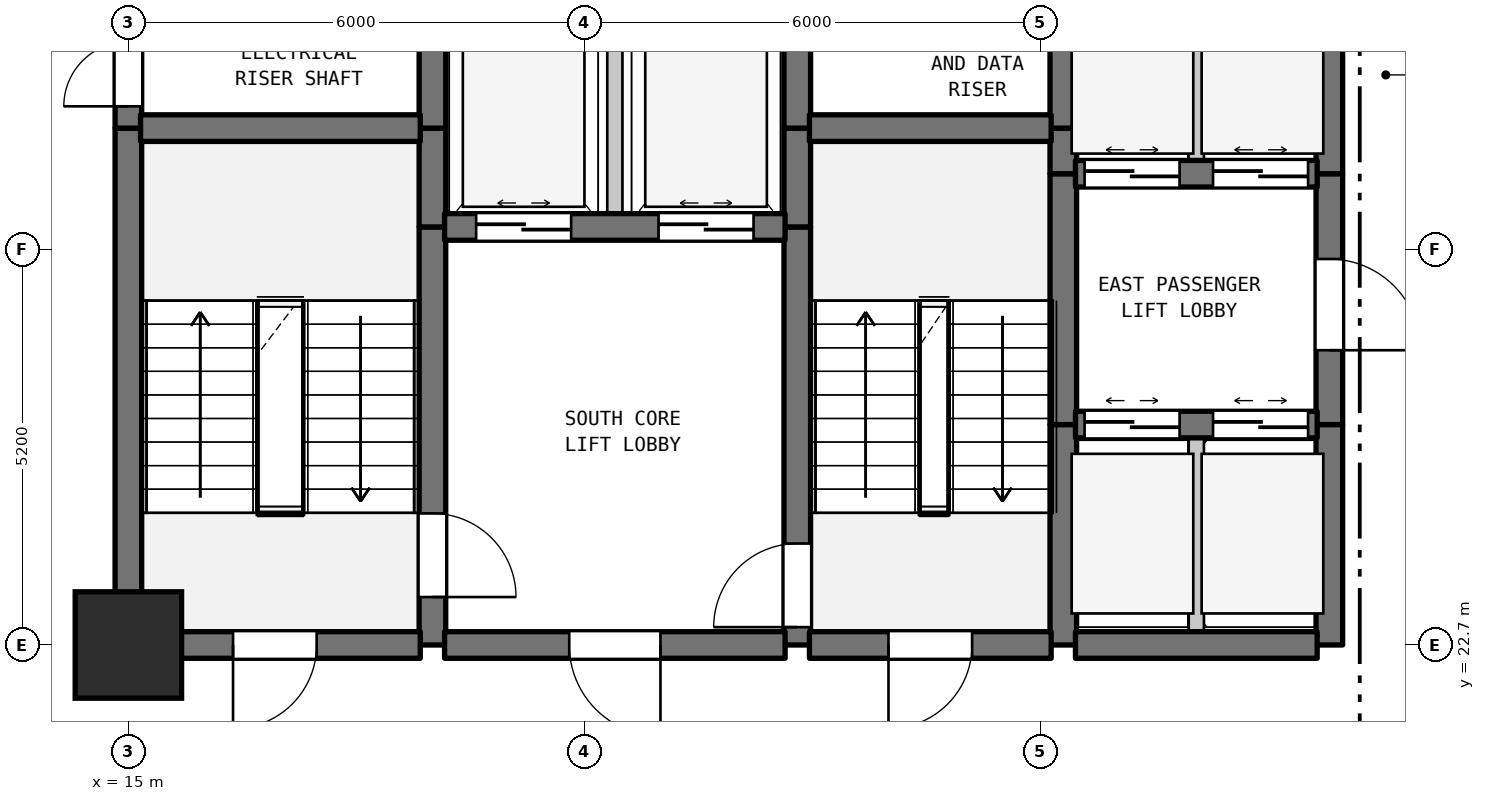
"""IFC4 building model, lengths in metres.
Left out: names, types, materials, properties, quantities, classifications, styles, units other than length and angle.
Written with IfcOpenShell. Run it as: python <this file> out.ifc"""

import sys

from ifc_helpers import new_model, si_unit, direction, frame, frame_2d, origin, origin_2d, place, context, subcontext, project, spatial, rectangle, extrude, element, fill, save


model = new_model("IFC4")
c1 = context("Model", 3, precision=1e-05, world=origin(), true_north=direction((0.0, 1.0)))
c2 = subcontext(c1, "Body", "Model", "MODEL_VIEW")
j1 = project(units=[si_unit("LENGTHUNIT", "METRE"), si_unit("PLANEANGLEUNIT", "RADIAN")], contexts=[c1])
p1 = place(None, origin())
s1 = spatial("IfcSite", under=j1, at=p1, CompositionType="ELEMENT")
p2 = place(p1, origin())
s2 = spatial("IfcBuilding", under=s1, at=p2, CompositionType="ELEMENT")
p3 = place(p2, origin())
s3 = spatial("IfcBuildingStorey", under=s2, at=p3, CompositionType="ELEMENT", Elevation=0.0)
p4 = place(p3, frame((15.0, 22.7, 0.0), z_axis=(0.0, 0.0, 1.0), x_axis=(1.0, 0.0, 0.0)))
e1 = element("IfcColumn", 1, at=p4, inside=s3, PredefinedType="COLUMN", context=c2, shape_type="SweptSolid", body=[
    extrude(rectangle(XDim=1.4, YDim=1.4, at=origin_2d()), origin(), (0.0, 0.0, 1.0), 6.5),
])
p5 = place(p3, frame((15.0, 22.7, 0.0), z_axis=(0.0, 0.0, 1.0), x_axis=(0.0, 1.0, 0.0)))
e2 = element("IfcWall", 2, at=p5, inside=s3, PredefinedType="SHEAR", context=c2, shape_type="SweptSolid", body=[
    extrude(rectangle(XDim=6.8, YDim=0.35, at=frame_2d((3.4, 0.0))), origin(), (0.0, 0.0, 1.0), 6.17),
])
p6 = place(p3, frame((15.0, 29.5, 0.0), z_axis=(0.0, 0.0, 1.0), x_axis=(0.0, 1.0, 0.0)))
e3 = element("IfcWall", 3, at=p6, inside=s3, PredefinedType="SHEAR", context=c2, shape_type="SweptSolid", body=[
    extrude(rectangle(XDim=1.6, YDim=0.35, at=frame_2d((0.8, 0.0))), origin(), (0.0, 0.0, 1.0), 6.17),
])
p7 = place(p6, frame((0.287, 0.0, 0.0)))
e4 = element("IfcOpeningElement", 4, at=p7, cuts=e3, PredefinedType="OPENING", context=c2, shape_type="SweptSolid", body=[
    extrude(rectangle(XDim=0.85, YDim=2.1, at=frame_2d((0.425, 1.05))), frame((0.0, 0.185, 0.0), z_axis=(0.0, -1.0, 0.0), x_axis=(1.0, 0.0, 0.0)), (0.0, 0.0, 1.0), 0.37),
])
p8 = place(p3, frame((19.0, 22.7, 0.0), z_axis=(0.0, 0.0, 1.0), x_axis=(0.0, 1.0, 0.0)))
e5 = element("IfcWall", 5, at=p8, inside=s3, PredefinedType="SHEAR", context=c2, shape_type="SweptSolid", body=[
    extrude(rectangle(XDim=5.5, YDim=0.35, at=frame_2d((2.75, 0.0))), origin(), (0.0, 0.0, 1.0), 6.17),
])
p9 = place(p8, frame((0.631, 0.0, 0.0)))
e6 = element("IfcOpeningElement", 6, at=p9, cuts=e5, PredefinedType="OPENING", context=c2, shape_type="SweptSolid", body=[
    extrude(rectangle(XDim=1.1, YDim=2.15, at=frame_2d((0.55, 1.075))), frame((0.0, 0.185, 0.0), z_axis=(0.0, -1.0, 0.0), x_axis=(1.0, 0.0, 0.0)), (0.0, 0.0, 1.0), 0.37),
])
p10 = place(p3, frame((19.0, 28.2, 0.0), z_axis=(0.0, 0.0, 1.0), x_axis=(0.0, 1.0, 0.0)))
e7 = element("IfcWall", 7, at=p10, inside=s3, PredefinedType="SHEAR", context=c2, shape_type="SweptSolid", body=[
    extrude(rectangle(XDim=1.3, YDim=0.35, at=frame_2d((0.65, 0.0))), origin(), (0.0, 0.0, 1.0), 6.17),
])
p11 = place(p3, frame((19.0, 29.5, 0.0), z_axis=(0.0, 0.0, 1.0), x_axis=(0.0, 1.0, 0.0)))
e8 = element("IfcWall", 8, at=p11, inside=s3, PredefinedType="SHEAR", context=c2, shape_type="SweptSolid", body=[
    extrude(rectangle(XDim=5.5, YDim=0.35, at=frame_2d((2.75, 0.0))), origin(), (0.0, 0.0, 1.0), 6.17),
])
p12 = place(p11, frame((2.025, 0.0, 0.0)))
e9 = element("IfcOpeningElement", 9, at=p12, cuts=e8, PredefinedType="OPENING", context=c2, shape_type="SweptSolid", body=[
    extrude(rectangle(XDim=1.1, YDim=2.15, at=frame_2d((0.55, 1.075))), frame((0.0, 0.185, 0.0), z_axis=(0.0, -1.0, 0.0), x_axis=(1.0, 0.0, 0.0)), (0.0, 0.0, 1.0), 0.37),
])
p13 = place(p3, frame((21.4, 28.2, 0.0), z_axis=(0.0, 0.0, 1.0), x_axis=(0.0, 1.0, 0.0)))
e10 = element("IfcWall", 10, at=p13, inside=s3, PredefinedType="STANDARD", context=c2, shape_type="SweptSolid", body=[
    extrude(rectangle(XDim=2.6, YDim=0.2, at=frame_2d((1.3, 0.0))), origin(), (0.0, 0.0, 1.0), 6.17),
])
p14 = place(p3, frame((23.8, 22.7, 0.0), z_axis=(0.0, 0.0, 1.0), x_axis=(0.0, 1.0, 0.0)))
e11 = element("IfcWall", 11, at=p14, inside=s3, PredefinedType="SHEAR", context=c2, shape_type="SweptSolid", body=[
    extrude(rectangle(XDim=5.5, YDim=0.35, at=frame_2d((2.75, 0.0))), origin(), (0.0, 0.0, 1.0), 6.17),
])
p15 = place(p14, frame((0.235, 0.0, 0.0)))
e12 = element("IfcOpeningElement", 12, at=p15, cuts=e11, PredefinedType="OPENING", context=c2, shape_type="SweptSolid", body=[
    extrude(rectangle(XDim=1.1, YDim=2.15, at=frame_2d((0.55, 1.075))), frame((0.0, 0.185, 0.0), z_axis=(0.0, -1.0, 0.0), x_axis=(1.0, 0.0, 0.0)), (0.0, 0.0, 1.0), 0.37),
])
for number, where, z_axis, x_axis in (
    (13, (23.8, 28.2, 0.0), (0.0, 0.0, 1.0), (0.0, 1.0, 0.0)),
    (14, (23.8, 29.5, 0.0), (0.0, 0.0, 1.0), (0.0, 1.0, 0.0)),
):
    element("IfcWall", number, at=place(p3, frame(where, z_axis=z_axis, x_axis=x_axis)), inside=s3, PredefinedType="SHEAR", context=c2, shape_type="SweptSolid", body=[
        extrude(rectangle(XDim=1.3, YDim=0.35, at=frame_2d((0.65, 0.0))), origin(), (0.0, 0.0, 1.0), 6.17),
    ])
p16 = place(p3, frame((27.3, 22.7, 0.0), z_axis=(0.0, 0.0, 1.0), x_axis=(0.0, 1.0, 0.0)))
e15 = element("IfcWall", 15, at=p16, inside=s3, PredefinedType="SHEAR", context=c2, shape_type="SweptSolid", body=[
    extrude(rectangle(XDim=2.9, YDim=0.35, at=frame_2d((1.45, 0.0))), origin(), (0.0, 0.0, 1.0), 6.17),
])
p17 = place(p3, frame((27.3, 25.6, 0.0), z_axis=(0.0, 0.0, 1.0), x_axis=(0.0, 1.0, 0.0)))
e16 = element("IfcWall", 16, at=p17, inside=s3, PredefinedType="SHEAR", context=c2, shape_type="SweptSolid", body=[
    extrude(rectangle(XDim=3.3, YDim=0.35, at=frame_2d((1.65, 0.0))), origin(), (0.0, 0.0, 1.0), 6.17),
])
p18 = place(p3, frame((27.3, 28.9, 0.0), z_axis=(0.0, 0.0, 1.0), x_axis=(0.0, 1.0, 0.0)))
e17 = element("IfcWall", 17, at=p18, inside=s3, PredefinedType="SHEAR", context=c2, shape_type="SweptSolid", body=[
    extrude(rectangle(XDim=0.6, YDim=0.35, at=frame_2d((0.3, 0.0))), origin(), (0.0, 0.0, 1.0), 6.17),
])
p19 = place(p3, frame((27.3, 29.5, 0.0), z_axis=(0.0, 0.0, 1.0), x_axis=(0.0, 1.0, 0.0)))
e18 = element("IfcWall", 18, at=p19, inside=s3, PredefinedType="SHEAR", context=c2, shape_type="SweptSolid", body=[
    extrude(rectangle(XDim=2.0, YDim=0.35, at=frame_2d((1.0, 0.0))), origin(), (0.0, 0.0, 1.0), 6.17),
])
p20 = place(p3, frame((29.05, 22.7, 0.0), z_axis=(0.0, 0.0, 1.0), x_axis=(0.0, 1.0, 0.0)))
e19 = element("IfcWall", 19, at=p20, inside=s3, PredefinedType="STANDARD", context=c2, shape_type="SweptSolid", body=[
    extrude(rectangle(XDim=2.9, YDim=0.2, at=frame_2d((1.45, 0.0))), origin(), (0.0, 0.0, 1.0), 6.17),
])
p21 = place(p3, frame((29.05, 28.9, 0.0), z_axis=(0.0, 0.0, 1.0), x_axis=(0.0, 1.0, 0.0)))
e20 = element("IfcWall", 20, at=p21, inside=s3, PredefinedType="STANDARD", context=c2, shape_type="SweptSolid", body=[
    extrude(rectangle(XDim=2.6, YDim=0.2, at=frame_2d((1.3, 0.0))), origin(), (0.0, 0.0, 1.0), 6.17),
])
p22 = place(p3, frame((30.8, 22.7, 0.0), z_axis=(0.0, 0.0, 1.0), x_axis=(0.0, 1.0, 0.0)))
e21 = element("IfcWall", 21, at=p22, inside=s3, PredefinedType="SHEAR", context=c2, shape_type="SweptSolid", body=[
    extrude(rectangle(XDim=2.9, YDim=0.35, at=frame_2d((1.45, 0.0))), origin(), (0.0, 0.0, 1.0), 6.17),
])
p23 = place(p3, frame((30.8, 25.6, 0.0), z_axis=(0.0, 0.0, 1.0), x_axis=(0.0, 1.0, 0.0)))
e22 = element("IfcWall", 22, at=p23, inside=s3, PredefinedType="SHEAR", context=c2, shape_type="SweptSolid", body=[
    extrude(rectangle(XDim=3.3, YDim=0.35, at=frame_2d((1.65, 0.0))), origin(), (0.0, 0.0, 1.0), 6.17),
])
p24 = place(p23, frame((0.978, 0.0, 0.0)))
e23 = element("IfcOpeningElement", 23, at=p24, cuts=e22, PredefinedType="OPENING", context=c2, shape_type="SweptSolid", body=[
    extrude(rectangle(XDim=1.2, YDim=2.2, at=frame_2d((0.6, 1.1))), frame((0.0, 0.185, 0.0), z_axis=(0.0, -1.0, 0.0), x_axis=(1.0, 0.0, 0.0)), (0.0, 0.0, 1.0), 0.37),
])
p25 = place(p3, frame((30.8, 28.9, 0.0), z_axis=(0.0, 0.0, 1.0), x_axis=(0.0, 1.0, 0.0)))
e24 = element("IfcWall", 24, at=p25, inside=s3, PredefinedType="SHEAR", context=c2, shape_type="SweptSolid", body=[
    extrude(rectangle(XDim=2.6, YDim=0.35, at=frame_2d((1.3, 0.0))), origin(), (0.0, 0.0, 1.0), 6.17),
])
p26 = place(p3, frame((15.16, 22.7, 0.0), z_axis=(0.0, 0.0, 1.0), x_axis=(1.0, 0.0, 0.0)))
e25 = element("IfcWall", 25, at=p26, inside=s3, PredefinedType="SHEAR", context=c2, shape_type="SweptSolid", body=[
    extrude(rectangle(XDim=3.68, YDim=0.35, at=frame_2d((1.84, 0.0))), origin(), (0.0, 0.0, 1.0), 6.17),
])
p27 = place(p26, frame((1.217, 0.0, 0.0)))
e26 = element("IfcOpeningElement", 26, at=p27, cuts=e25, PredefinedType="OPENING", context=c2, shape_type="SweptSolid", body=[
    extrude(rectangle(XDim=1.1, YDim=2.15, at=frame_2d((0.55, 1.075))), frame((0.0, 0.185, 0.0), z_axis=(0.0, -1.0, 0.0), x_axis=(1.0, 0.0, 0.0)), (0.0, 0.0, 1.0), 0.37),
])
p28 = place(p3, frame((19.16, 22.7, 0.0), z_axis=(0.0, 0.0, 1.0), x_axis=(1.0, 0.0, 0.0)))
e27 = element("IfcWall", 27, at=p28, inside=s3, PredefinedType="SHEAR", context=c2, shape_type="SweptSolid", body=[
    extrude(rectangle(XDim=4.48, YDim=0.35, at=frame_2d((2.24, 0.0))), origin(), (0.0, 0.0, 1.0), 6.17),
])
p29 = place(p28, frame((1.64, 0.0, 0.0)))
e28 = element("IfcOpeningElement", 28, at=p29, cuts=e27, PredefinedType="OPENING", context=c2, shape_type="SweptSolid", body=[
    extrude(rectangle(XDim=1.2, YDim=2.2, at=frame_2d((0.6, 1.1))), frame((0.0, 0.185, 0.0), z_axis=(0.0, -1.0, 0.0), x_axis=(1.0, 0.0, 0.0)), (0.0, 0.0, 1.0), 0.37),
])
p30 = place(p3, frame((23.96, 22.7, 0.0), z_axis=(0.0, 0.0, 1.0), x_axis=(1.0, 0.0, 0.0)))
e29 = element("IfcWall", 29, at=p30, inside=s3, PredefinedType="SHEAR", context=c2, shape_type="SweptSolid", body=[
    extrude(rectangle(XDim=3.18, YDim=0.35, at=frame_2d((1.59, 0.0))), origin(), (0.0, 0.0, 1.0), 6.17),
])
p31 = place(p30, frame((1.04, 0.0, 0.0)))
e30 = element("IfcOpeningElement", 30, at=p31, cuts=e29, PredefinedType="OPENING", context=c2, shape_type="SweptSolid", body=[
    extrude(rectangle(XDim=1.1, YDim=2.15, at=frame_2d((0.55, 1.075))), frame((0.0, 0.185, 0.0), z_axis=(0.0, -1.0, 0.0), x_axis=(1.0, 0.0, 0.0)), (0.0, 0.0, 1.0), 0.37),
])
p32 = place(p3, frame((27.46, 22.7, 0.0), z_axis=(0.0, 0.0, 1.0), x_axis=(1.0, 0.0, 0.0)))
e31 = element("IfcWall", 31, at=p32, inside=s3, PredefinedType="SHEAR", context=c2, shape_type="SweptSolid", body=[
    extrude(rectangle(XDim=3.18, YDim=0.35, at=frame_2d((1.59, 0.0))), origin(), (0.0, 0.0, 1.0), 6.17),
])
p33 = place(p3, frame((27.46, 25.6, 0.0), z_axis=(0.0, 0.0, 1.0), x_axis=(1.0, 0.0, 0.0)))
e32 = element("IfcWall", 32, at=p33, inside=s3, PredefinedType="SHEAR", context=c2, shape_type="SweptSolid", body=[
    extrude(rectangle(XDim=3.18, YDim=0.35, at=frame_2d((1.59, 0.0))), origin(), (0.0, 0.0, 1.0), 6.17),
])
p34 = place(p33, frame((0.12, 0.0, 0.0)))
e33 = element("IfcOpeningElement", 33, at=p34, cuts=e32, PredefinedType="OPENING", context=c2, shape_type="SweptSolid", body=[
    extrude(rectangle(XDim=1.25, YDim=2.2, at=frame_2d((0.625, 1.1))), frame((0.0, 0.185, 0.0), z_axis=(0.0, -1.0, 0.0), x_axis=(1.0, 0.0, 0.0)), (0.0, 0.0, 1.0), 0.37),
])
p35 = place(p33, frame((1.81, 0.0, 0.0)))
e34 = element("IfcOpeningElement", 34, at=p35, cuts=e32, PredefinedType="OPENING", context=c2, shape_type="SweptSolid", body=[
    extrude(rectangle(XDim=1.25, YDim=2.2, at=frame_2d((0.625, 1.1))), frame((0.0, 0.185, 0.0), z_axis=(0.0, -1.0, 0.0), x_axis=(1.0, 0.0, 0.0)), (0.0, 0.0, 1.0), 0.37),
])
p36 = place(p3, frame((19.16, 28.2, 0.0), z_axis=(0.0, 0.0, 1.0), x_axis=(1.0, 0.0, 0.0)))
e35 = element("IfcWall", 35, at=p36, inside=s3, PredefinedType="SHEAR", context=c2, shape_type="SweptSolid", body=[
    extrude(rectangle(XDim=4.48, YDim=0.35, at=frame_2d((2.24, 0.0))), origin(), (0.0, 0.0, 1.0), 6.17),
])
p37 = place(p36, frame((0.415, 0.0, 0.0)))
e36 = element("IfcOpeningElement", 36, at=p37, cuts=e35, PredefinedType="OPENING", context=c2, shape_type="SweptSolid", body=[
    extrude(rectangle(XDim=1.25, YDim=2.2, at=frame_2d((0.625, 1.1))), frame((0.0, 0.185, 0.0), z_axis=(0.0, -1.0, 0.0), x_axis=(1.0, 0.0, 0.0)), (0.0, 0.0, 1.0), 0.37),
])
p38 = place(p36, frame((2.815, 0.0, 0.0)))
e37 = element("IfcOpeningElement", 37, at=p38, cuts=e35, PredefinedType="OPENING", context=c2, shape_type="SweptSolid", body=[
    extrude(rectangle(XDim=1.25, YDim=2.2, at=frame_2d((0.625, 1.1))), frame((0.0, 0.185, 0.0), z_axis=(0.0, -1.0, 0.0), x_axis=(1.0, 0.0, 0.0)), (0.0, 0.0, 1.0), 0.37),
])
p39 = place(p3, frame((27.46, 28.9, 0.0), z_axis=(0.0, 0.0, 1.0), x_axis=(1.0, 0.0, 0.0)))
e38 = element("IfcWall", 38, at=p39, inside=s3, PredefinedType="SHEAR", context=c2, shape_type="SweptSolid", body=[
    extrude(rectangle(XDim=3.18, YDim=0.35, at=frame_2d((1.59, 0.0))), origin(), (0.0, 0.0, 1.0), 6.17),
])
p40 = place(p39, frame((0.12, 0.0, 0.0)))
e39 = element("IfcOpeningElement", 39, at=p40, cuts=e38, PredefinedType="OPENING", context=c2, shape_type="SweptSolid", body=[
    extrude(rectangle(XDim=1.25, YDim=2.2, at=frame_2d((0.625, 1.1))), frame((0.0, 0.185, 0.0), z_axis=(0.0, -1.0, 0.0), x_axis=(1.0, 0.0, 0.0)), (0.0, 0.0, 1.0), 0.37),
])
p41 = place(p39, frame((1.81, 0.0, 0.0)))
e40 = element("IfcOpeningElement", 40, at=p41, cuts=e38, PredefinedType="OPENING", context=c2, shape_type="SweptSolid", body=[
    extrude(rectangle(XDim=1.25, YDim=2.2, at=frame_2d((0.625, 1.1))), frame((0.0, 0.185, 0.0), z_axis=(0.0, -1.0, 0.0), x_axis=(1.0, 0.0, 0.0)), (0.0, 0.0, 1.0), 0.37),
])
p42 = place(p3, frame((15.16, 29.5, 0.0), z_axis=(0.0, 0.0, 1.0), x_axis=(1.0, 0.0, 0.0)))
e41 = element("IfcWall", 41, at=p42, inside=s3, PredefinedType="SHEAR", context=c2, shape_type="SweptSolid", body=[
    extrude(rectangle(XDim=3.68, YDim=0.35, at=frame_2d((1.84, 0.0))), origin(), (0.0, 0.0, 1.0), 6.17),
])
p43 = place(p3, frame((23.96, 29.5, 0.0), z_axis=(0.0, 0.0, 1.0), x_axis=(1.0, 0.0, 0.0)))
e42 = element("IfcWall", 42, at=p43, inside=s3, PredefinedType="SHEAR", context=c2, shape_type="SweptSolid", body=[
    extrude(rectangle(XDim=3.18, YDim=0.35, at=frame_2d((1.59, 0.0))), origin(), (0.0, 0.0, 1.0), 6.17),
])
p44 = place(p7, origin())
e43 = element("IfcDoor", 43, at=p44, inside=s3, OperationType="SINGLE_SWING_LEFT", PredefinedType="DOOR", context=c2, shape_type="SweptSolid", body=[
    extrude(rectangle(XDim=0.85, YDim=2.1, at=frame_2d((0.425, 1.05))), frame((0.0, 0.025, 0.0), z_axis=(0.0, -1.0, 0.0), x_axis=(1.0, 0.0, 0.0)), (0.0, 0.0, 1.0), 0.05),
])
fill(e4, e43)
p45 = place(p9, frame((1.1, 0.0, 0.0), z_axis=(0.0, 0.0, 1.0), x_axis=(-1.0, 0.0, 0.0)))
e44 = element("IfcDoor", 44, at=p45, inside=s3, OperationType="SINGLE_SWING_LEFT", PredefinedType="DOOR", context=c2, shape_type="SweptSolid", body=[
    extrude(rectangle(XDim=1.1, YDim=2.15, at=frame_2d((0.55, 1.075))), frame((0.0, 0.025, 0.0), z_axis=(0.0, -1.0, 0.0), x_axis=(1.0, 0.0, 0.0)), (0.0, 0.0, 1.0), 0.05),
])
fill(e6, e44)
p46 = place(p15, origin())
e45 = element("IfcDoor", 45, at=p46, inside=s3, OperationType="SINGLE_SWING_LEFT", PredefinedType="DOOR", context=c2, shape_type="SweptSolid", body=[
    extrude(rectangle(XDim=1.1, YDim=2.15, at=frame_2d((0.55, 1.075))), frame((0.0, 0.025, 0.0), z_axis=(0.0, -1.0, 0.0), x_axis=(1.0, 0.0, 0.0)), (0.0, 0.0, 1.0), 0.05),
])
fill(e12, e45)
p47 = place(p24, frame((1.2, 0.0, 0.0), z_axis=(0.0, 0.0, 1.0), x_axis=(-1.0, 0.0, 0.0)))
e46 = element("IfcDoor", 46, at=p47, inside=s3, OperationType="SINGLE_SWING_LEFT", PredefinedType="DOOR", context=c2, shape_type="SweptSolid", body=[
    extrude(rectangle(XDim=1.2, YDim=2.2, at=frame_2d((0.6, 1.1))), frame((0.0, 0.025, 0.0), z_axis=(0.0, -1.0, 0.0), x_axis=(1.0, 0.0, 0.0)), (0.0, 0.0, 1.0), 0.05),
])
fill(e23, e46)
p48 = place(p27, frame((1.1, 0.0, 0.0), z_axis=(0.0, 0.0, 1.0), x_axis=(-1.0, 0.0, 0.0)))
e47 = element("IfcDoor", 47, at=p48, inside=s3, OperationType="SINGLE_SWING_LEFT", PredefinedType="DOOR", context=c2, shape_type="SweptSolid", body=[
    extrude(rectangle(XDim=1.1, YDim=2.15, at=frame_2d((0.55, 1.075))), frame((0.0, 0.025, 0.0), z_axis=(0.0, -1.0, 0.0), x_axis=(1.0, 0.0, 0.0)), (0.0, 0.0, 1.0), 0.05),
])
fill(e26, e47)
p49 = place(p29, frame((1.2, 0.0, 0.0), z_axis=(0.0, 0.0, 1.0), x_axis=(-1.0, 0.0, 0.0)))
e48 = element("IfcDoor", 48, at=p49, inside=s3, OperationType="SINGLE_SWING_RIGHT", PredefinedType="DOOR", context=c2, shape_type="SweptSolid", body=[
    extrude(rectangle(XDim=1.2, YDim=2.2, at=frame_2d((0.6, 1.1))), frame((0.0, 0.025, 0.0), z_axis=(0.0, -1.0, 0.0), x_axis=(1.0, 0.0, 0.0)), (0.0, 0.0, 1.0), 0.05),
])
fill(e28, e48)
p50 = place(p31, frame((1.1, 0.0, 0.0), z_axis=(0.0, 0.0, 1.0), x_axis=(-1.0, 0.0, 0.0)))
e49 = element("IfcDoor", 49, at=p50, inside=s3, OperationType="SINGLE_SWING_LEFT", PredefinedType="DOOR", context=c2, shape_type="SweptSolid", body=[
    extrude(rectangle(XDim=1.1, YDim=2.15, at=frame_2d((0.55, 1.075))), frame((0.0, 0.025, 0.0), z_axis=(0.0, -1.0, 0.0), x_axis=(1.0, 0.0, 0.0)), (0.0, 0.0, 1.0), 0.05),
])
fill(e30, e49)
p51 = place(p34, origin())
e50 = element("IfcDoor", 50, at=p51, inside=s3, OperationType="DOUBLE_DOOR_SLIDING", PredefinedType="DOOR", context=c2, shape_type="SweptSolid", body=[
    extrude(rectangle(XDim=1.25, YDim=2.2, at=frame_2d((0.625, 1.1))), frame((0.0, 0.025, 0.0), z_axis=(0.0, -1.0, 0.0), x_axis=(1.0, 0.0, 0.0)), (0.0, 0.0, 1.0), 0.05),
])
fill(e33, e50)
p52 = place(p35, origin())
e51 = element("IfcDoor", 51, at=p52, inside=s3, OperationType="DOUBLE_DOOR_SLIDING", PredefinedType="DOOR", context=c2, shape_type="SweptSolid", body=[
    extrude(rectangle(XDim=1.25, YDim=2.2, at=frame_2d((0.625, 1.1))), frame((0.0, 0.025, 0.0), z_axis=(0.0, -1.0, 0.0), x_axis=(1.0, 0.0, 0.0)), (0.0, 0.0, 1.0), 0.05),
])
fill(e34, e51)
p53 = place(p37, origin())
e52 = element("IfcDoor", 52, at=p53, inside=s3, OperationType="DOUBLE_DOOR_SLIDING", PredefinedType="DOOR", context=c2, shape_type="SweptSolid", body=[
    extrude(rectangle(XDim=1.25, YDim=2.2, at=frame_2d((0.625, 1.1))), frame((0.0, 0.025, 0.0), z_axis=(0.0, -1.0, 0.0), x_axis=(1.0, 0.0, 0.0)), (0.0, 0.0, 1.0), 0.05),
])
fill(e36, e52)
p54 = place(p38, origin())
e53 = element("IfcDoor", 53, at=p54, inside=s3, OperationType="DOUBLE_DOOR_SLIDING", PredefinedType="DOOR", context=c2, shape_type="SweptSolid", body=[
    extrude(rectangle(XDim=1.25, YDim=2.2, at=frame_2d((0.625, 1.1))), frame((0.0, 0.025, 0.0), z_axis=(0.0, -1.0, 0.0), x_axis=(1.0, 0.0, 0.0)), (0.0, 0.0, 1.0), 0.05),
])
fill(e37, e53)
p55 = place(p40, origin())
e54 = element("IfcDoor", 54, at=p55, inside=s3, OperationType="DOUBLE_DOOR_SLIDING", PredefinedType="DOOR", context=c2, shape_type="SweptSolid", body=[
    extrude(rectangle(XDim=1.25, YDim=2.2, at=frame_2d((0.625, 1.1))), frame((0.0, 0.025, 0.0), z_axis=(0.0, -1.0, 0.0), x_axis=(1.0, 0.0, 0.0)), (0.0, 0.0, 1.0), 0.05),
])
fill(e39, e54)
p56 = place(p41, origin())
e55 = element("IfcDoor", 55, at=p56, inside=s3, OperationType="DOUBLE_DOOR_SLIDING", PredefinedType="DOOR", context=c2, shape_type="SweptSolid", body=[
    extrude(rectangle(XDim=1.25, YDim=2.2, at=frame_2d((0.625, 1.1))), frame((0.0, 0.025, 0.0), z_axis=(0.0, -1.0, 0.0), x_axis=(1.0, 0.0, 0.0)), (0.0, 0.0, 1.0), 0.05),
])
fill(e40, e55)
save(model, sys.argv[1])
